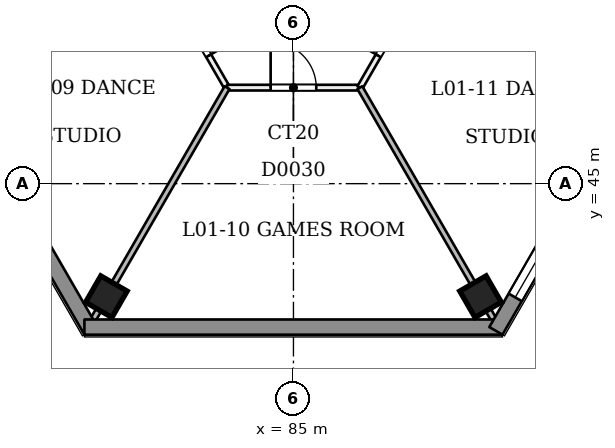
"""IFC4 building model, lengths in metres.
Left out: names, types, materials, properties, quantities, classifications, styles, units other than length and angle.
Written with IfcOpenShell. Run it as: python <this file> out.ifc"""

import sys

from ifc_helpers import new_model, si_unit, direction, frame, frame_2d, origin, origin_2d, place, context, subcontext, project, spatial, rectangle, extrude, element, fill, save


model = new_model("IFC4")
c1 = context("Model", 3, precision=1e-05, world=origin(), true_north=direction((0.0, 1.0)))
c2 = subcontext(c1, "Body", "Model", "MODEL_VIEW")
j1 = project(units=[si_unit("LENGTHUNIT", "METRE"), si_unit("PLANEANGLEUNIT", "RADIAN")], contexts=[c1])
p1 = place(None, origin())
s1 = spatial("IfcSite", under=j1, at=p1, CompositionType="ELEMENT")
p2 = place(p1, origin())
s2 = spatial("IfcBuilding", under=s1, at=p2, CompositionType="ELEMENT")
p3 = place(p2, frame((0.0, 0.0, 9.0)))
s3 = spatial("IfcBuildingStorey", under=s2, at=p3, CompositionType="ELEMENT", Elevation=9.0)
for number, where, z_axis, x_axis in (
    (1, (80.077, 42.026, 0.0), (0.0, 0.0, 1.0), (0.5, 0.866, 0.0)),
    (2, (89.923, 42.026, 0.0), (0.0, 0.0, 1.0), (0.866, 0.5, 0.0)),
):
    element("IfcColumn", number, at=place(p3, frame(where, z_axis=z_axis, x_axis=x_axis)), inside=s3, PredefinedType="COLUMN", context=c2, shape_type="SweptSolid", body=[
        extrude(rectangle(XDim=0.8, YDim=0.8, at=origin_2d()), origin(), (0.0, 0.0, 1.0), 4.5),
    ])
p4 = place(p3, frame((55.57, 95.474, 0.0), z_axis=(0.0, 0.0, 1.0), x_axis=(0.500000085768, -0.866025354266, 0.0)))
e3 = element("IfcWall", 3, at=p4, inside=s3, PredefinedType="PARTITIONING", context=c2, shape_type="SweptSolid", body=[
    extrude(rectangle(XDim=55.365, YDim=0.15, at=frame_2d((27.682, 0.0))), origin(), (0.0, 0.0, 1.0), 4.05),
])
p5 = place(p4, frame((6.832, 0.0, 0.0)))
e4 = element("IfcOpeningElement", 4, at=p5, cuts=e3, PredefinedType="OPENING", context=c2, shape_type="SweptSolid", body=[
    extrude(rectangle(XDim=1.2, YDim=2.1, at=frame_2d((0.6, 1.05))), frame((0.0, 0.085, 0.0), z_axis=(0.0, -1.0, 0.0), x_axis=(1.0, 0.0, 0.0)), (0.0, 0.0, 1.0), 0.171),
])
p6 = place(p4, frame((18.182, 0.0, 0.0)))
e5 = element("IfcOpeningElement", 5, at=p6, cuts=e3, PredefinedType="OPENING", context=c2, shape_type="SweptSolid", body=[
    extrude(rectangle(XDim=1.0, YDim=2.1, at=frame_2d((0.5, 1.05))), frame((0.0, 0.085, 0.0), z_axis=(0.0, -1.0, 0.0), x_axis=(1.0, 0.0, 0.0)), (0.0, 0.0, 1.0), 0.171),
])
p7 = place(p4, frame((30.132, 0.0, 0.0)))
e6 = element("IfcOpeningElement", 6, at=p7, cuts=e3, PredefinedType="OPENING", context=c2, shape_type="SweptSolid", body=[
    extrude(rectangle(XDim=1.2, YDim=2.1, at=frame_2d((0.6, 1.05))), frame((0.0, 0.085, 0.0), z_axis=(0.0, -1.0, 0.0), x_axis=(1.0, 0.0, 0.0)), (0.0, 0.0, 1.0), 0.171),
])
p8 = place(p4, frame((40.582, 0.0, 0.0)))
e7 = element("IfcOpeningElement", 7, at=p8, cuts=e3, PredefinedType="OPENING", context=c2, shape_type="SweptSolid", body=[
    extrude(rectangle(XDim=1.2, YDim=2.1, at=frame_2d((0.6, 1.05))), frame((0.0, 0.085, 0.0), z_axis=(0.0, -1.0, 0.0), x_axis=(1.0, 0.0, 0.0)), (0.0, 0.0, 1.0), 0.171),
])
p9 = place(p4, frame((46.315, 0.0, 0.0)))
e8 = element("IfcOpeningElement", 8, at=p9, cuts=e3, PredefinedType="OPENING", context=c2, shape_type="SweptSolid", body=[
    extrude(rectangle(XDim=0.9, YDim=2.1, at=frame_2d((0.45, 1.05))), frame((0.0, 0.085, 0.0), z_axis=(0.0, -1.0, 0.0), x_axis=(1.0, 0.0, 0.0)), (0.0, 0.0, 1.0), 0.171),
])
p10 = place(p4, frame((48.565, 0.0, 0.0)))
e9 = element("IfcOpeningElement", 9, at=p10, cuts=e3, PredefinedType="OPENING", context=c2, shape_type="SweptSolid", body=[
    extrude(rectangle(XDim=0.9, YDim=2.1, at=frame_2d((0.45, 1.05))), frame((0.0, 0.085, 0.0), z_axis=(0.0, -1.0, 0.0), x_axis=(1.0, 0.0, 0.0)), (0.0, 0.0, 1.0), 0.171),
])
p11 = place(p4, frame((53.195, 0.0, 0.0)))
e10 = element("IfcOpeningElement", 10, at=p11, cuts=e3, PredefinedType="OPENING", context=c2, shape_type="SweptSolid", body=[
    extrude(rectangle(XDim=1.2, YDim=2.1, at=frame_2d((0.6, 1.05))), frame((0.0, 0.085, 0.0), z_axis=(0.0, -1.0, 0.0), x_axis=(1.0, 0.0, 0.0)), (0.0, 0.0, 1.0), 0.171),
])
p12 = place(p3, frame((83.253, 47.526, 0.0), z_axis=(0.0, 0.0, 1.0), x_axis=(1.0, 0.0, 0.0)))
e11 = element("IfcWall", 11, at=p12, inside=s3, PredefinedType="PARTITIONING", context=c2, shape_type="SweptSolid", body=[
    extrude(rectangle(XDim=3.495, YDim=0.15, at=frame_2d((1.747, 0.0))), origin(), (0.0, 0.0, 1.0), 4.05),
])
p13 = place(p12, frame((1.147, 0.0, 0.0)))
e12 = element("IfcOpeningElement", 12, at=p13, cuts=e11, PredefinedType="OPENING", context=c2, shape_type="SweptSolid", body=[
    extrude(rectangle(XDim=1.2, YDim=2.1, at=frame_2d((0.6, 1.05))), frame((0.0, 0.085, 0.0), z_axis=(0.0, -1.0, 0.0), x_axis=(1.0, 0.0, 0.0)), (0.0, 0.0, 1.0), 0.171),
])
p14 = place(p3, frame((86.747, 47.526, 0.0), z_axis=(0.0, 0.0, 1.0), x_axis=(0.500000085768, 0.866025354266, 0.0)))
e13 = element("IfcWall", 13, at=p14, inside=s3, PredefinedType="PARTITIONING", context=c2, shape_type="SweptSolid", body=[
    extrude(rectangle(XDim=55.365, YDim=0.15, at=frame_2d((27.682, 0.0))), origin(), (0.0, 0.0, 1.0), 4.05),
])
p15 = place(p14, frame((0.97, 0.0, 0.0)))
e14 = element("IfcOpeningElement", 14, at=p15, cuts=e13, PredefinedType="OPENING", context=c2, shape_type="SweptSolid", body=[
    extrude(rectangle(XDim=1.2, YDim=2.1, at=frame_2d((0.6, 1.05))), frame((0.0, 0.085, 0.0), z_axis=(0.0, -1.0, 0.0), x_axis=(1.0, 0.0, 0.0)), (0.0, 0.0, 1.0), 0.171),
])
p16 = place(p14, frame((9.082, 0.0, 0.0)))
e15 = element("IfcOpeningElement", 15, at=p16, cuts=e13, PredefinedType="OPENING", context=c2, shape_type="SweptSolid", body=[
    extrude(rectangle(XDim=1.2, YDim=2.1, at=frame_2d((0.6, 1.05))), frame((0.0, 0.085, 0.0), z_axis=(0.0, -1.0, 0.0), x_axis=(1.0, 0.0, 0.0)), (0.0, 0.0, 1.0), 0.171),
])
p17 = place(p14, frame((18.082, 0.0, 0.0)))
e16 = element("IfcOpeningElement", 16, at=p17, cuts=e13, PredefinedType="OPENING", context=c2, shape_type="SweptSolid", body=[
    extrude(rectangle(XDim=1.2, YDim=2.1, at=frame_2d((0.6, 1.05))), frame((0.0, 0.085, 0.0), z_axis=(0.0, -1.0, 0.0), x_axis=(1.0, 0.0, 0.0)), (0.0, 0.0, 1.0), 0.171),
])
p18 = place(p14, frame((23.613, 0.0, 0.0)))
e17 = element("IfcOpeningElement", 17, at=p18, cuts=e13, PredefinedType="OPENING", context=c2, shape_type="SweptSolid", body=[
    extrude(rectangle(XDim=1.0, YDim=2.1, at=frame_2d((0.5, 1.05))), frame((0.0, 0.085, 0.0), z_axis=(0.0, -1.0, 0.0), x_axis=(1.0, 0.0, 0.0)), (0.0, 0.0, 1.0), 0.171),
])
p19 = place(p14, frame((26.363, 0.0, 0.0)))
e18 = element("IfcOpeningElement", 18, at=p19, cuts=e13, PredefinedType="OPENING", context=c2, shape_type="SweptSolid", body=[
    extrude(rectangle(XDim=1.0, YDim=2.1, at=frame_2d((0.5, 1.05))), frame((0.0, 0.085, 0.0), z_axis=(0.0, -1.0, 0.0), x_axis=(1.0, 0.0, 0.0)), (0.0, 0.0, 1.0), 0.171),
])
p20 = place(p14, frame((33.032, 0.0, 0.0)))
e19 = element("IfcOpeningElement", 19, at=p20, cuts=e13, PredefinedType="OPENING", context=c2, shape_type="SweptSolid", body=[
    extrude(rectangle(XDim=1.2, YDim=2.1, at=frame_2d((0.6, 1.05))), frame((0.0, 0.085, 0.0), z_axis=(0.0, -1.0, 0.0), x_axis=(1.0, 0.0, 0.0)), (0.0, 0.0, 1.0), 0.171),
])
p21 = place(p14, frame((47.337, 0.0, 0.0)))
e20 = element("IfcOpeningElement", 20, at=p21, cuts=e13, PredefinedType="OPENING", context=c2, shape_type="SweptSolid", body=[
    extrude(rectangle(XDim=1.2, YDim=2.1, at=frame_2d((0.6, 1.05))), frame((0.0, 0.085, 0.0), z_axis=(0.0, -1.0, 0.0), x_axis=(1.0, 0.0, 0.0)), (0.0, 0.0, 1.0), 0.171),
])
for number, where, z_axis, x_axis in (
    (21, (79.558, 41.126, 0.0), (0.0, 0.0, 1.0), (0.5, 0.866, 0.0)),
    (22, (90.442, 41.126, 0.0), (0.0, 0.0, 1.0), (-0.5, 0.866, 0.0)),
):
    element("IfcWall", number, at=place(p3, frame(where, z_axis=z_axis, x_axis=x_axis)), inside=s3, PredefinedType="PARTITIONING", context=c2, shape_type="SweptSolid", body=[
        extrude(rectangle(XDim=7.39, YDim=0.15, at=frame_2d((3.695, 0.0))), origin(), (0.0, 0.0, 1.0), 4.05),
    ])
p22 = place(p3, frame((79.673, 41.126, 0.0), z_axis=(0.0, 0.0, 1.0), x_axis=(-0.499997306052, 0.866026959131, 0.0)))
e23 = element("IfcWall", 23, at=p22, inside=s3, PredefinedType="SOLIDWALL", context=c2, shape_type="SweptSolid", body=[
    extrude(rectangle(XDim=62.87, YDim=0.4, at=frame_2d((31.435, 0.0))), origin(), (0.0, 0.0, 1.0), 4.05),
])
p23 = place(p22, frame((54.986, 0.0, 0.9)))
e24 = element("IfcOpeningElement", 24, at=p23, cuts=e23, PredefinedType="OPENING", context=c2, shape_type="SweptSolid", body=[
    extrude(rectangle(XDim=2.4, YDim=1.5, at=frame_2d((1.2, 0.75))), frame((0.0, 0.21, 0.0), z_axis=(0.0, -1.0, 0.0), x_axis=(1.0, 0.0, 0.0)), (0.0, 0.0, 1.0), 0.421),
])
p24 = place(p22, frame((50.486, 0.0, 0.9)))
e25 = element("IfcOpeningElement", 25, at=p24, cuts=e23, PredefinedType="OPENING", context=c2, shape_type="SweptSolid", body=[
    extrude(rectangle(XDim=2.4, YDim=1.5, at=frame_2d((1.2, 0.75))), frame((0.0, 0.21, 0.0), z_axis=(0.0, -1.0, 0.0), x_axis=(1.0, 0.0, 0.0)), (0.0, 0.0, 1.0), 0.421),
])
p25 = place(p22, frame((45.986, 0.0, 0.9)))
e26 = element("IfcOpeningElement", 26, at=p25, cuts=e23, PredefinedType="OPENING", context=c2, shape_type="SweptSolid", body=[
    extrude(rectangle(XDim=2.4, YDim=1.5, at=frame_2d((1.2, 0.75))), frame((0.0, 0.21, 0.0), z_axis=(0.0, -1.0, 0.0), x_axis=(1.0, 0.0, 0.0)), (0.0, 0.0, 1.0), 0.421),
])
p26 = place(p22, frame((32.486, 0.0, 0.9)))
e27 = element("IfcOpeningElement", 27, at=p26, cuts=e23, PredefinedType="OPENING", context=c2, shape_type="SweptSolid", body=[
    extrude(rectangle(XDim=2.4, YDim=1.5, at=frame_2d((1.2, 0.75))), frame((0.0, 0.21, 0.0), z_axis=(0.0, -1.0, 0.0), x_axis=(1.0, 0.0, 0.0)), (0.0, 0.0, 1.0), 0.421),
])
p27 = place(p22, frame((27.986, 0.0, 0.9)))
e28 = element("IfcOpeningElement", 28, at=p27, cuts=e23, PredefinedType="OPENING", context=c2, shape_type="SweptSolid", body=[
    extrude(rectangle(XDim=2.4, YDim=1.5, at=frame_2d((1.2, 0.75))), frame((0.0, 0.21, 0.0), z_axis=(0.0, -1.0, 0.0), x_axis=(1.0, 0.0, 0.0)), (0.0, 0.0, 1.0), 0.421),
])
p28 = place(p22, frame((23.486, 0.0, 0.9)))
e29 = element("IfcOpeningElement", 29, at=p28, cuts=e23, PredefinedType="OPENING", context=c2, shape_type="SweptSolid", body=[
    extrude(rectangle(XDim=2.4, YDim=1.5, at=frame_2d((1.2, 0.75))), frame((0.0, 0.21, 0.0), z_axis=(0.0, -1.0, 0.0), x_axis=(1.0, 0.0, 0.0)), (0.0, 0.0, 1.0), 0.421),
])
p29 = place(p22, frame((18.986, 0.0, 0.9)))
e30 = element("IfcOpeningElement", 30, at=p29, cuts=e23, PredefinedType="OPENING", context=c2, shape_type="SweptSolid", body=[
    extrude(rectangle(XDim=2.4, YDim=1.5, at=frame_2d((1.2, 0.75))), frame((0.0, 0.21, 0.0), z_axis=(0.0, -1.0, 0.0), x_axis=(1.0, 0.0, 0.0)), (0.0, 0.0, 1.0), 0.421),
])
p30 = place(p22, frame((14.486, 0.0, 0.9)))
e31 = element("IfcOpeningElement", 31, at=p30, cuts=e23, PredefinedType="OPENING", context=c2, shape_type="SweptSolid", body=[
    extrude(rectangle(XDim=2.4, YDim=1.5, at=frame_2d((1.2, 0.75))), frame((0.0, 0.21, 0.0), z_axis=(0.0, -1.0, 0.0), x_axis=(1.0, 0.0, 0.0)), (0.0, 0.0, 1.0), 0.421),
])
p31 = place(p3, frame((90.5, 41.226, 0.0), z_axis=(0.0, 0.0, 1.0), x_axis=(-1.0, 0.0, 0.0)))
e32 = element("IfcWall", 32, at=p31, inside=s3, PredefinedType="SOLIDWALL", context=c2, shape_type="SweptSolid", body=[
    extrude(rectangle(XDim=11.0, YDim=0.4, at=frame_2d((5.5, 0.0))), origin(), (0.0, 0.0, 1.0), 4.05),
])
p32 = place(p3, frame((121.762, 95.574, 0.0), z_axis=(0.0, 0.0, 1.0), x_axis=(-0.499997306052, -0.866026959131, 0.0)))
e33 = element("IfcWall", 33, at=p32, inside=s3, PredefinedType="SOLIDWALL", context=c2, shape_type="SweptSolid", body=[
    extrude(rectangle(XDim=62.87, YDim=0.4, at=frame_2d((31.435, 0.0))), origin(), (0.0, 0.0, 1.0), 4.05),
])
p33 = place(p32, frame((59.452, 0.0, 0.9)))
e34 = element("IfcOpeningElement", 34, at=p33, cuts=e33, PredefinedType="OPENING", context=c2, shape_type="SweptSolid", body=[
    extrude(rectangle(XDim=2.4, YDim=1.5, at=frame_2d((1.2, 0.75))), frame((0.0, 0.21, 0.0), z_axis=(0.0, -1.0, 0.0), x_axis=(1.0, 0.0, 0.0)), (0.0, 0.0, 1.0), 0.421),
])
p34 = place(p32, frame((54.986, 0.0, 0.9)))
e35 = element("IfcOpeningElement", 35, at=p34, cuts=e33, PredefinedType="OPENING", context=c2, shape_type="SweptSolid", body=[
    extrude(rectangle(XDim=2.4, YDim=1.5, at=frame_2d((1.2, 0.75))), frame((0.0, 0.21, 0.0), z_axis=(0.0, -1.0, 0.0), x_axis=(1.0, 0.0, 0.0)), (0.0, 0.0, 1.0), 0.421),
])
p35 = place(p32, frame((50.486, 0.0, 0.9)))
e36 = element("IfcOpeningElement", 36, at=p35, cuts=e33, PredefinedType="OPENING", context=c2, shape_type="SweptSolid", body=[
    extrude(rectangle(XDim=2.4, YDim=1.5, at=frame_2d((1.2, 0.75))), frame((0.0, 0.21, 0.0), z_axis=(0.0, -1.0, 0.0), x_axis=(1.0, 0.0, 0.0)), (0.0, 0.0, 1.0), 0.421),
])
p36 = place(p32, frame((45.986, 0.0, 0.9)))
e37 = element("IfcOpeningElement", 37, at=p36, cuts=e33, PredefinedType="OPENING", context=c2, shape_type="SweptSolid", body=[
    extrude(rectangle(XDim=2.4, YDim=1.5, at=frame_2d((1.2, 0.75))), frame((0.0, 0.21, 0.0), z_axis=(0.0, -1.0, 0.0), x_axis=(1.0, 0.0, 0.0)), (0.0, 0.0, 1.0), 0.421),
])
p37 = place(p32, frame((41.486, 0.0, 0.9)))
e38 = element("IfcOpeningElement", 38, at=p37, cuts=e33, PredefinedType="OPENING", context=c2, shape_type="SweptSolid", body=[
    extrude(rectangle(XDim=2.4, YDim=1.5, at=frame_2d((1.2, 0.75))), frame((0.0, 0.21, 0.0), z_axis=(0.0, -1.0, 0.0), x_axis=(1.0, 0.0, 0.0)), (0.0, 0.0, 1.0), 0.421),
])
p38 = place(p32, frame((36.986, 0.0, 0.9)))
e39 = element("IfcOpeningElement", 39, at=p38, cuts=e33, PredefinedType="OPENING", context=c2, shape_type="SweptSolid", body=[
    extrude(rectangle(XDim=2.4, YDim=1.5, at=frame_2d((1.2, 0.75))), frame((0.0, 0.21, 0.0), z_axis=(0.0, -1.0, 0.0), x_axis=(1.0, 0.0, 0.0)), (0.0, 0.0, 1.0), 0.421),
])
p39 = place(p32, frame((23.486, 0.0, 0.9)))
e40 = element("IfcOpeningElement", 40, at=p39, cuts=e33, PredefinedType="OPENING", context=c2, shape_type="SweptSolid", body=[
    extrude(rectangle(XDim=2.4, YDim=1.5, at=frame_2d((1.2, 0.75))), frame((0.0, 0.21, 0.0), z_axis=(0.0, -1.0, 0.0), x_axis=(1.0, 0.0, 0.0)), (0.0, 0.0, 1.0), 0.421),
])
p40 = place(p32, frame((18.986, 0.0, 0.9)))
e41 = element("IfcOpeningElement", 41, at=p40, cuts=e33, PredefinedType="OPENING", context=c2, shape_type="SweptSolid", body=[
    extrude(rectangle(XDim=2.4, YDim=1.5, at=frame_2d((1.2, 0.75))), frame((0.0, 0.21, 0.0), z_axis=(0.0, -1.0, 0.0), x_axis=(1.0, 0.0, 0.0)), (0.0, 0.0, 1.0), 0.421),
])
p41 = place(p32, frame((14.486, 0.0, 0.9)))
e42 = element("IfcOpeningElement", 42, at=p41, cuts=e33, PredefinedType="OPENING", context=c2, shape_type="SweptSolid", body=[
    extrude(rectangle(XDim=2.4, YDim=1.5, at=frame_2d((1.2, 0.75))), frame((0.0, 0.21, 0.0), z_axis=(0.0, -1.0, 0.0), x_axis=(1.0, 0.0, 0.0)), (0.0, 0.0, 1.0), 0.421),
])
p42 = place(p32, frame((5.486, 0.0, 0.9)))
e43 = element("IfcOpeningElement", 43, at=p42, cuts=e33, PredefinedType="OPENING", context=c2, shape_type="SweptSolid", body=[
    extrude(rectangle(XDim=2.4, YDim=1.5, at=frame_2d((1.2, 0.75))), frame((0.0, 0.21, 0.0), z_axis=(0.0, -1.0, 0.0), x_axis=(1.0, 0.0, 0.0)), (0.0, 0.0, 1.0), 0.421),
])
p43 = place(p32, frame((1.018, 0.0, 0.9)))
e44 = element("IfcOpeningElement", 44, at=p43, cuts=e33, PredefinedType="OPENING", context=c2, shape_type="SweptSolid", body=[
    extrude(rectangle(XDim=2.4, YDim=1.5, at=frame_2d((1.2, 0.75))), frame((0.0, 0.21, 0.0), z_axis=(0.0, -1.0, 0.0), x_axis=(1.0, 0.0, 0.0)), (0.0, 0.0, 1.0), 0.421),
])
p44 = place(p11, origin())
e45 = element("IfcDoor", 45, at=p44, inside=s3, OperationType="SINGLE_SWING_RIGHT", PredefinedType="NOTDEFINED", context=c2, shape_type="SweptSolid", body=[
    extrude(rectangle(XDim=1.2, YDim=2.1, at=frame_2d((0.6, 1.05))), frame((0.0, 0.025, 0.0), z_axis=(0.0, -1.0, 0.0), x_axis=(1.0, 0.0, 0.0)), (0.0, 0.0, 1.0), 0.05),
])
fill(e10, e45)
p45 = place(p13, origin())
e46 = element("IfcDoor", 46, at=p45, inside=s3, OperationType="SINGLE_SWING_LEFT", PredefinedType="NOTDEFINED", context=c2, shape_type="SweptSolid", body=[
    extrude(rectangle(XDim=1.2, YDim=2.1, at=frame_2d((0.6, 1.05))), frame((0.0, 0.025, 0.0), z_axis=(0.0, -1.0, 0.0), x_axis=(1.0, 0.0, 0.0)), (0.0, 0.0, 1.0), 0.05),
])
fill(e12, e46)
p46 = place(p15, origin())
e47 = element("IfcDoor", 47, at=p46, inside=s3, OperationType="SINGLE_SWING_LEFT", PredefinedType="NOTDEFINED", context=c2, shape_type="SweptSolid", body=[
    extrude(rectangle(XDim=1.2, YDim=2.1, at=frame_2d((0.6, 1.05))), frame((0.0, 0.025, 0.0), z_axis=(0.0, -1.0, 0.0), x_axis=(1.0, 0.0, 0.0)), (0.0, 0.0, 1.0), 0.05),
])
fill(e14, e47)
p47 = place(p33, origin())
e48 = element("IfcWindow", 48, at=p47, inside=s3, PartitioningType="SINGLE_PANEL", PredefinedType="WINDOW", context=c2, shape_type="SweptSolid", body=[
    extrude(rectangle(XDim=2.4, YDim=1.5, at=frame_2d((1.2, 0.75))), frame((0.0, 0.03, 0.0), z_axis=(0.0, -1.0, 0.0), x_axis=(1.0, 0.0, 0.0)), (0.0, 0.0, 1.0), 0.06),
])
fill(e34, e48)
save(model, sys.argv[1])
